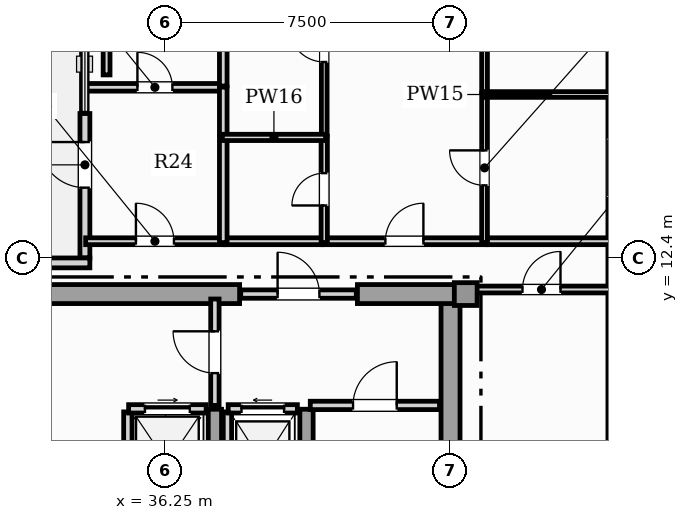
"""IFC4 building model, lengths in metres.
Left out: names, types, materials, properties, quantities, classifications, styles, units other than length and angle.
Written with IfcOpenShell. Run it as: python <this file> out.ifc"""

import sys

from ifc_helpers import new_model, si_unit, direction, frame, frame_2d, origin, origin_2d, place, context, subcontext, project, spatial, rectangle, extrude, element, fill, save


model = new_model("IFC4")
c1 = context("Model", 3, precision=1e-05, world=origin(), true_north=direction((0.0, 1.0)))
c2 = subcontext(c1, "Body", "Model", "MODEL_VIEW")
j1 = project(units=[si_unit("LENGTHUNIT", "METRE"), si_unit("PLANEANGLEUNIT", "RADIAN")], contexts=[c1])
p1 = place(None, origin())
s1 = spatial("IfcSite", under=j1, at=p1, CompositionType="ELEMENT")
p2 = place(p1, origin())
s2 = spatial("IfcBuilding", under=s1, at=p2, CompositionType="ELEMENT")
p3 = place(p2, frame((0.0, 0.0, 337.5)))
s3 = spatial("IfcBuildingStorey", under=s2, at=p3, CompositionType="ELEMENT", Elevation=337.5)
p4 = place(p3, frame((43.75, 0.92, 0.0), z_axis=(0.0, 0.0, 1.0), x_axis=(0.0, 1.0, 0.0)))
e1 = element("IfcWall", 1, at=p4, inside=s3, PredefinedType="SHEAR", context=c2, shape_type="SweptSolid", body=[
    extrude(rectangle(XDim=10.53, YDim=0.5, at=frame_2d((5.265, 0.0))), origin(), (0.0, 0.0, 1.0), 3.63),
])
p5 = place(p3, frame((30.9, 11.45, 0.0), z_axis=(0.0, 0.0, 1.0), x_axis=(1.0, 0.0, 0.0)))
e2 = element("IfcWall", 2, at=p5, inside=s3, PredefinedType="SHEAR", context=c2, shape_type="SweptSolid", body=[
    extrude(rectangle(XDim=7.3, YDim=0.5, at=frame_2d((3.65, 0.0))), origin(), (0.0, 0.0, 1.0), 3.63),
])
p6 = place(p3, frame((41.3, 11.45, 0.0), z_axis=(0.0, 0.0, 1.0), x_axis=(1.0, 0.0, 0.0)))
e3 = element("IfcWall", 3, at=p6, inside=s3, PredefinedType="SHEAR", context=c2, shape_type="SweptSolid", body=[
    extrude(rectangle(XDim=2.95, YDim=0.5, at=frame_2d((1.475, 0.0))), origin(), (0.0, 0.0, 1.0), 3.63),
])
for number, where, z_axis, x_axis in (
    (4, (37.55, 0.92, 0.0), (0.0, 0.0, 1.0), (0.0, 1.0, 0.0)),
    (5, (39.96, 0.92, 0.0), (0.0, 0.0, 1.0), (0.0, 1.0, 0.0)),
):
    element("IfcWall", number, at=place(p3, frame(where, z_axis=z_axis, x_axis=x_axis)), inside=s3, PredefinedType="SHEAR", context=c2, shape_type="SweptSolid", body=[
        extrude(rectangle(XDim=7.5, YDim=0.35, at=frame_2d((3.75, 0.0))), origin(), (0.0, 0.0, 1.0), 3.63),
    ])
p7 = place(p3, frame((44.15, 11.45, 0.0), z_axis=(0.0, 0.0, 1.0), x_axis=(1.0, 0.0, 0.0)))
e6 = element("IfcColumn", 6, at=p7, inside=s3, PredefinedType="COLUMN", context=c2, shape_type="SweptSolid", body=[
    extrude(rectangle(XDim=0.6, YDim=0.6, at=origin_2d()), origin(), (0.0, 0.0, 1.0), 3.85),
])
p8 = place(p3, frame((48.021, 3.24, 0.0), z_axis=(0.0, 0.0, 1.0), x_axis=(0.0, 1.0, 0.0)))
e7 = element("IfcWall", 7, at=p8, inside=s3, PredefinedType="SOLIDWALL", context=c2, shape_type="SweptSolid", body=[
    extrude(rectangle(XDim=25.374, YDim=0.26, at=frame_2d((12.687, 0.0))), origin(), (0.0, 0.0, 1.0), 3.63),
])
p9 = place(p8, frame((21.704, 0.0, 0.95)))
e8 = element("IfcOpeningElement", 8, at=p9, cuts=e7, PredefinedType="OPENING", context=c2, shape_type="SweptSolid", body=[
    extrude(rectangle(XDim=0.9, YDim=1.5, at=frame_2d((0.45, 0.75))), frame((0.0, 0.14, 0.0), z_axis=(0.0, -1.0, 0.0), x_axis=(1.0, 0.0, 0.0)), (0.0, 0.0, 1.0), 0.28),
])
p10 = place(p8, frame((10.781, 0.0, 0.9)))
e9 = element("IfcOpeningElement", 9, at=p10, cuts=e7, PredefinedType="OPENING", context=c2, shape_type="SweptSolid", body=[
    extrude(rectangle(XDim=1.5, YDim=1.95, at=frame_2d((0.75, 0.975))), frame((0.0, 0.14, 0.0), z_axis=(0.0, -1.0, 0.0), x_axis=(1.0, 0.0, 0.0)), (0.0, 0.0, 1.0), 0.28),
])
p11 = place(p8, frame((15.07, 0.0, 0.9)))
e10 = element("IfcOpeningElement", 10, at=p11, cuts=e7, PredefinedType="OPENING", context=c2, shape_type="SweptSolid", body=[
    extrude(rectangle(XDim=1.5, YDim=1.95, at=frame_2d((0.75, 0.975))), frame((0.0, 0.14, 0.0), z_axis=(0.0, -1.0, 0.0), x_axis=(1.0, 0.0, 0.0)), (0.0, 0.0, 1.0), 0.28),
])
p12 = place(p8, frame((19.056, 0.0, 0.9)))
e11 = element("IfcOpeningElement", 11, at=p12, cuts=e7, PredefinedType="OPENING", context=c2, shape_type="SweptSolid", body=[
    extrude(rectangle(XDim=1.5, YDim=1.95, at=frame_2d((0.75, 0.975))), frame((0.0, 0.14, 0.0), z_axis=(0.0, -1.0, 0.0), x_axis=(1.0, 0.0, 0.0)), (0.0, 0.0, 1.0), 0.28),
])
p13 = place(p8, frame((23.104, 0.0, 0.9)))
e12 = element("IfcOpeningElement", 12, at=p13, cuts=e7, PredefinedType="OPENING", context=c2, shape_type="SweptSolid", body=[
    extrude(rectangle(XDim=1.5, YDim=1.95, at=frame_2d((0.75, 0.975))), frame((0.0, 0.14, 0.0), z_axis=(0.0, -1.0, 0.0), x_axis=(1.0, 0.0, 0.0)), (0.0, 0.0, 1.0), 0.28),
])
p14 = place(p3, frame((34.13, 12.4, 0.0), z_axis=(0.0, 0.0, 1.0), x_axis=(0.0, 1.0, 0.0)))
e13 = element("IfcWall", 13, at=p14, inside=s3, PredefinedType="SOLIDWALL", context=c2, shape_type="SweptSolid", body=[
    extrude(rectangle(XDim=3.8, YDim=0.26, at=frame_2d((1.9, 0.0))), origin(), (0.0, 0.0, 1.0), 3.17),
])
p15 = place(p14, frame((1.85, 0.0, 0.0)))
e14 = element("IfcOpeningElement", 14, at=p15, cuts=e13, PredefinedType="OPENING", context=c2, shape_type="SweptSolid", body=[
    extrude(rectangle(XDim=1.2, YDim=2.2, at=frame_2d((0.6, 1.1))), frame((0.0, 0.14, 0.0), z_axis=(0.0, -1.0, 0.0), x_axis=(1.0, 0.0, 0.0)), (0.0, 0.0, 1.0), 0.28),
])
p16 = place(p3, frame((34.26, 12.27, 0.0), z_axis=(0.0, 0.0, 1.0), x_axis=(-1.0, 0.0, 0.0)))
e15 = element("IfcWall", 15, at=p16, inside=s3, PredefinedType="SOLIDWALL", context=c2, shape_type="SweptSolid", body=[
    extrude(rectangle(XDim=11.02, YDim=0.26, at=frame_2d((5.51, 0.0))), origin(), (0.0, 0.0, 1.0), 3.63),
])
p17 = place(p3, frame((37.88, 5.65, 0.0), z_axis=(0.0, 0.0, 1.0), x_axis=(0.0, 1.0, 0.0)))
e16 = element("IfcWall", 16, at=p17, inside=s3, PredefinedType="SOLIDWALL", context=c2, shape_type="SweptSolid", body=[
    extrude(rectangle(XDim=2.7, YDim=0.22, at=frame_2d((1.35, 0.0))), origin(), (0.0, 0.0, 1.0), 3.63),
])
p18 = place(p3, frame((37.9, 8.43, 0.0), z_axis=(0.0, 0.0, 1.0), x_axis=(1.0, 0.0, 0.0)))
e17 = element("IfcWall", 17, at=p18, inside=s3, PredefinedType="SOLIDWALL", context=c2, shape_type="SweptSolid", body=[
    extrude(rectangle(XDim=1.82, YDim=0.22, at=frame_2d((0.91, 0.0))), origin(), (0.0, 0.0, 1.0), 3.63),
])
p19 = place(p18, frame((0.35, 0.0, 0.0)))
e18 = element("IfcOpeningElement", 18, at=p19, cuts=e17, PredefinedType="OPENING", context=c2, shape_type="SweptSolid", body=[
    extrude(rectangle(XDim=1.12, YDim=2.25, at=frame_2d((0.56, 1.125))), frame((0.0, 0.12, 0.0), z_axis=(0.0, -1.0, 0.0), x_axis=(1.0, 0.0, 0.0)), (0.0, 0.0, 1.0), 0.24),
])
p20 = place(p3, frame((35.26, 5.65, 0.0), z_axis=(0.0, 0.0, 1.0), x_axis=(0.0, 1.0, 0.0)))
e19 = element("IfcWall", 19, at=p20, inside=s3, PredefinedType="SOLIDWALL", context=c2, shape_type="SweptSolid", body=[
    extrude(rectangle(XDim=2.7, YDim=0.22, at=frame_2d((1.35, 0.0))), origin(), (0.0, 0.0, 1.0), 3.63),
])
p21 = place(p3, frame((35.28, 8.43, 0.0), z_axis=(0.0, 0.0, 1.0), x_axis=(1.0, 0.0, 0.0)))
e20 = element("IfcWall", 20, at=p21, inside=s3, PredefinedType="SOLIDWALL", context=c2, shape_type="SweptSolid", body=[
    extrude(rectangle(XDim=2.04, YDim=0.22, at=frame_2d((1.02, 0.0))), origin(), (0.0, 0.0, 1.0), 3.63),
])
p22 = place(p21, frame((0.43, 0.0, 0.0)))
e21 = element("IfcOpeningElement", 21, at=p22, cuts=e20, PredefinedType="OPENING", context=c2, shape_type="SweptSolid", body=[
    extrude(rectangle(XDim=1.18, YDim=2.2, at=frame_2d((0.59, 1.1))), frame((0.0, 0.12, 0.0), z_axis=(0.0, -1.0, 0.0), x_axis=(1.0, 0.0, 0.0)), (0.0, 0.0, 1.0), 0.24),
])
p23 = place(p3, frame((40.06, 8.52, 0.0), z_axis=(0.0, 0.0, 1.0), x_axis=(1.0, 0.0, 0.0)))
e22 = element("IfcWall", 22, at=p23, inside=s3, PredefinedType="SOLIDWALL", context=c2, shape_type="SweptSolid", body=[
    extrude(rectangle(XDim=3.4, YDim=0.22, at=frame_2d((1.7, 0.0))), origin(), (0.0, 0.0, 1.0), 3.63),
])
p24 = place(p23, frame((1.125, 0.0, 0.0)))
e23 = element("IfcOpeningElement", 23, at=p24, cuts=e22, PredefinedType="OPENING", context=c2, shape_type="SweptSolid", body=[
    extrude(rectangle(XDim=1.15, YDim=2.2, at=frame_2d((0.575, 1.1))), frame((0.0, 0.12, 0.0), z_axis=(0.0, -1.0, 0.0), x_axis=(1.0, 0.0, 0.0)), (0.0, 0.0, 1.0), 0.24),
])
p25 = place(p3, frame((37.55, 8.52, 0.0), z_axis=(0.0, 0.0, 1.0), x_axis=(0.0, 1.0, 0.0)))
e24 = element("IfcWall", 24, at=p25, inside=s3, PredefinedType="SOLIDWALL", context=c2, shape_type="SweptSolid", body=[
    extrude(rectangle(XDim=2.8, YDim=0.22, at=frame_2d((1.4, 0.0))), origin(), (0.0, 0.0, 1.0), 3.085),
])
p26 = place(p25, frame((0.85, 0.0, 0.0)))
e25 = element("IfcOpeningElement", 25, at=p26, cuts=e24, PredefinedType="OPENING", context=c2, shape_type="SweptSolid", body=[
    extrude(rectangle(XDim=1.1, YDim=2.2, at=frame_2d((0.55, 1.1))), frame((0.0, 0.12, 0.0), z_axis=(0.0, -1.0, 0.0), x_axis=(1.0, 0.0, 0.0)), (0.0, 0.0, 1.0), 0.24),
])
p27 = place(p3, frame((38.23, 11.45, 0.0), z_axis=(0.0, 0.0, 1.0), x_axis=(1.0, 0.0, 0.0)))
e26 = element("IfcWall", 26, at=p27, inside=s3, PredefinedType="SOLIDWALL", context=c2, shape_type="SweptSolid", body=[
    extrude(rectangle(XDim=3.04, YDim=0.22, at=frame_2d((1.52, 0.0))), origin(), (0.0, 0.0, 1.0), 3.63),
])
p28 = place(p27, frame((0.97, 0.0, 0.0)))
e27 = element("IfcOpeningElement", 27, at=p28, cuts=e26, PredefinedType="OPENING", context=c2, shape_type="SweptSolid", body=[
    extrude(rectangle(XDim=1.1, YDim=2.2, at=frame_2d((0.55, 1.1))), frame((0.0, 0.12, 0.0), z_axis=(0.0, -1.0, 0.0), x_axis=(1.0, 0.0, 0.0)), (0.0, 0.0, 1.0), 0.24),
])
p29 = place(p3, frame((44.285, 11.57, 0.0), z_axis=(0.0, 0.0, 1.0), x_axis=(1.0, 0.0, 0.0)))
e28 = element("IfcWall", 28, at=p29, inside=s3, PredefinedType="PARTITIONING", context=c2, shape_type="SweptSolid", body=[
    extrude(rectangle(XDim=3.717, YDim=0.18, at=frame_2d((1.859, 0.0))), origin(), (0.0, 0.0, 1.0), 3.63),
])
p30 = place(p29, frame((1.359, 0.0, 0.0)))
e29 = element("IfcOpeningElement", 29, at=p30, cuts=e28, PredefinedType="OPENING", context=c2, shape_type="SweptSolid", body=[
    extrude(rectangle(XDim=1.0, YDim=2.15, at=frame_2d((0.5, 1.075))), frame((0.0, 0.1, 0.0), z_axis=(0.0, -1.0, 0.0), x_axis=(1.0, 0.0, 0.0)), (0.0, 0.0, 1.0), 0.2),
])
p31 = place(p3, frame((34.149, 12.84, 0.0), z_axis=(0.0, 0.0, 1.0), x_axis=(1.0, 0.0, 0.0)))
e30 = element("IfcWall", 30, at=p31, inside=s3, PredefinedType="PARTITIONING", context=c2, shape_type="SweptSolid", body=[
    extrude(rectangle(XDim=3.646, YDim=0.18, at=frame_2d((1.823, 0.0))), origin(), (0.0, 0.0, 1.0), 3.63),
])
p32 = place(p31, frame((1.323, 0.0, 0.0)))
e31 = element("IfcOpeningElement", 31, at=p32, cuts=e30, PredefinedType="OPENING", context=c2, shape_type="SweptSolid", body=[
    extrude(rectangle(XDim=1.0, YDim=2.15, at=frame_2d((0.5, 1.075))), frame((0.0, 0.1, 0.0), z_axis=(0.0, -1.0, 0.0), x_axis=(1.0, 0.0, 0.0)), (0.0, 0.0, 1.0), 0.2),
])
p33 = place(p3, frame((40.392, 12.84, 0.0), z_axis=(0.0, 0.0, 1.0), x_axis=(1.0, 0.0, 0.0)))
e32 = element("IfcWall", 32, at=p33, inside=s3, PredefinedType="PARTITIONING", context=c2, shape_type="SweptSolid", body=[
    extrude(rectangle(XDim=4.289, YDim=0.18, at=frame_2d((2.144, 0.0))), origin(), (0.0, 0.0, 1.0), 3.63),
])
p34 = place(p33, frame((1.644, 0.0, 0.0)))
e33 = element("IfcOpeningElement", 33, at=p34, cuts=e32, PredefinedType="OPENING", context=c2, shape_type="SweptSolid", body=[
    extrude(rectangle(XDim=1.0, YDim=2.15, at=frame_2d((0.5, 1.075))), frame((0.0, 0.1, 0.0), z_axis=(0.0, -1.0, 0.0), x_axis=(1.0, 0.0, 0.0)), (0.0, 0.0, 1.0), 0.2),
])
p35 = place(p3, frame((37.825, 12.84, 0.0), z_axis=(0.0, 0.0, 1.0), x_axis=(1.0, 0.0, 0.0)))
e34 = element("IfcWall", 34, at=p35, inside=s3, PredefinedType="PARTITIONING", context=c2, shape_type="SweptSolid", body=[
    extrude(rectangle(XDim=2.537, YDim=0.18, at=frame_2d((1.269, 0.0))), origin(), (0.0, 0.0, 1.0), 3.63),
])
p36 = place(p3, frame((44.71, 12.84, 0.0), z_axis=(0.0, 0.0, 1.0), x_axis=(1.0, 0.0, 0.0)))
e35 = element("IfcWall", 35, at=p36, inside=s3, PredefinedType="PARTITIONING", context=c2, shape_type="SweptSolid", body=[
    extrude(rectangle(XDim=3.292, YDim=0.18, at=frame_2d((1.646, 0.0))), origin(), (0.0, 0.0, 1.0), 3.63),
])
p37 = place(p3, frame((34.148, 16.89, 0.0), z_axis=(0.0, 0.0, 1.0), x_axis=(1.0, 0.0, 0.0)))
e36 = element("IfcWall", 36, at=p37, inside=s3, PredefinedType="PARTITIONING", context=c2, shape_type="SweptSolid", body=[
    extrude(rectangle(XDim=3.647, YDim=0.2, at=frame_2d((1.823, 0.0))), origin(), (0.0, 0.0, 1.0), 3.63),
])
p38 = place(p37, frame((1.364, 0.0, 0.0)))
e37 = element("IfcOpeningElement", 37, at=p38, cuts=e36, PredefinedType="OPENING", context=c2, shape_type="SweptSolid", body=[
    extrude(rectangle(XDim=0.92, YDim=2.1, at=frame_2d((0.46, 1.05))), frame((0.0, 0.11, 0.0), z_axis=(0.0, -1.0, 0.0), x_axis=(1.0, 0.0, 0.0)), (0.0, 0.0, 1.0), 0.22),
])
p39 = place(p3, frame((37.77, 12.805, 0.0), z_axis=(0.0, 0.0, 1.0), x_axis=(0.0, 1.0, 0.0)))
e38 = element("IfcWall", 38, at=p39, inside=s3, PredefinedType="PARTITIONING", context=c2, shape_type="SweptSolid", body=[
    extrude(rectangle(XDim=2.802, YDim=0.2, at=frame_2d((1.401, 0.0))), origin(), (0.0, 0.0, 1.0), 3.63),
])
p40 = place(p3, frame((37.77, 15.637, 0.0), z_axis=(0.0, 0.0, 1.0), x_axis=(0.0, 1.0, 0.0)))
e39 = element("IfcWall", 39, at=p40, inside=s3, PredefinedType="PARTITIONING", context=c2, shape_type="SweptSolid", body=[
    extrude(rectangle(XDim=1.258, YDim=0.2, at=frame_2d((0.629, 0.0))), origin(), (0.0, 0.0, 1.0), 3.63),
])
p41 = place(p3, frame((37.77, 16.925, 0.0), z_axis=(0.0, 0.0, 1.0), x_axis=(0.0, 1.0, 0.0)))
e40 = element("IfcWall", 40, at=p41, inside=s3, PredefinedType="PARTITIONING", context=c2, shape_type="SweptSolid", body=[
    extrude(rectangle(XDim=3.472, YDim=0.2, at=frame_2d((1.736, 0.0))), origin(), (0.0, 0.0, 1.0), 3.63),
])
p42 = place(p3, frame((40.427, 12.805, 0.0), z_axis=(0.0, 0.0, 1.0), x_axis=(0.0, 1.0, 0.0)))
e41 = element("IfcWall", 41, at=p42, inside=s3, PredefinedType="PLUMBINGWALL", context=c2, shape_type="SweptSolid", body=[
    extrude(rectangle(XDim=2.802, YDim=0.165, at=frame_2d((1.401, 0.0))), origin(), (0.0, 0.0, 1.0), 3.63),
])
p43 = place(p42, frame((0.976, 0.0, 0.0)))
e42 = element("IfcOpeningElement", 42, at=p43, cuts=e41, PredefinedType="OPENING", context=c2, shape_type="SweptSolid", body=[
    extrude(rectangle(XDim=0.85, YDim=2.1, at=frame_2d((0.425, 1.05))), frame((0.0, 0.093, 0.0), z_axis=(0.0, -1.0, 0.0), x_axis=(1.0, 0.0, 0.0)), (0.0, 0.0, 1.0), 0.185),
])
p44 = place(p3, frame((40.427, 15.637, 0.0), z_axis=(0.0, 0.0, 1.0), x_axis=(0.0, 1.0, 0.0)))
e43 = element("IfcWall", 43, at=p44, inside=s3, PredefinedType="PARTITIONING", context=c2, shape_type="SweptSolid", body=[
    extrude(rectangle(XDim=4.76, YDim=0.15, at=frame_2d((2.38, 0.0))), origin(), (0.0, 0.0, 1.0), 3.63),
])
p45 = place(p44, frame((1.92, 0.0, 0.0)))
e44 = element("IfcOpeningElement", 44, at=p45, cuts=e43, PredefinedType="OPENING", context=c2, shape_type="SweptSolid", body=[
    extrude(rectangle(XDim=0.92, YDim=2.1, at=frame_2d((0.46, 1.05))), frame((0.0, 0.085, 0.0), z_axis=(0.0, -1.0, 0.0), x_axis=(1.0, 0.0, 0.0)), (0.0, 0.0, 1.0), 0.17),
])
p46 = place(p3, frame((44.646, 12.805, 0.0), z_axis=(0.0, 0.0, 1.0), x_axis=(0.0, 1.0, 0.0)))
e45 = element("IfcWall", 45, at=p46, inside=s3, PredefinedType="PARTITIONING", context=c2, shape_type="SweptSolid", body=[
    extrude(rectangle(XDim=3.931, YDim=0.15, at=frame_2d((1.965, 0.0))), origin(), (0.0, 0.0, 1.0), 3.63),
])
p47 = place(p46, frame((1.506, 0.0, 0.0)))
e46 = element("IfcOpeningElement", 46, at=p47, cuts=e45, PredefinedType="OPENING", context=c2, shape_type="SweptSolid", body=[
    extrude(rectangle(XDim=0.92, YDim=2.1, at=frame_2d((0.46, 1.05))), frame((0.0, 0.085, 0.0), z_axis=(0.0, -1.0, 0.0), x_axis=(1.0, 0.0, 0.0)), (0.0, 0.0, 1.0), 0.17),
])
p48 = place(p3, frame((44.646, 16.766, 0.0), z_axis=(0.0, 0.0, 1.0), x_axis=(0.0, 1.0, 0.0)))
e47 = element("IfcWall", 47, at=p48, inside=s3, PredefinedType="PARTITIONING", context=c2, shape_type="SweptSolid", body=[
    extrude(rectangle(XDim=4.688, YDim=0.15, at=frame_2d((2.344, 0.0))), origin(), (0.0, 0.0, 1.0), 3.63),
])
p49 = place(p48, frame((1.884, 0.0, 0.0)))
e48 = element("IfcOpeningElement", 48, at=p49, cuts=e47, PredefinedType="OPENING", context=c2, shape_type="SweptSolid", body=[
    extrude(rectangle(XDim=0.92, YDim=2.1, at=frame_2d((0.46, 1.05))), frame((0.0, 0.085, 0.0), z_axis=(0.0, -1.0, 0.0), x_axis=(1.0, 0.0, 0.0)), (0.0, 0.0, 1.0), 0.17),
])
p50 = place(p3, frame((37.745, 15.572, 0.0), z_axis=(0.0, 0.0, 1.0), x_axis=(1.0, 0.0, 0.0)))
e49 = element("IfcWall", 49, at=p50, inside=s3, PredefinedType="PLUMBINGWALL", context=c2, shape_type="SweptSolid", body=[
    extrude(rectangle(XDim=2.717, YDim=0.165, at=frame_2d((1.358, 0.0))), origin(), (0.0, 0.0, 1.0), 3.63),
])
p51 = place(p3, frame((44.61, 16.701, 0.0), z_axis=(0.0, 0.0, 1.0), x_axis=(1.0, 0.0, 0.0)))
e50 = element("IfcWall", 50, at=p51, inside=s3, PredefinedType="PARTITIONING", context=c2, shape_type="SweptSolid", body=[
    extrude(rectangle(XDim=3.392, YDim=0.15, at=frame_2d((1.696, 0.0))), origin(), (0.0, 0.0, 1.0), 3.63),
])
p52 = place(p3, frame((34.7, 17.217, 0.0), z_axis=(0.0, 0.0, 1.0), x_axis=(0.0, 1.0, 0.0)))
e51 = element("IfcWall", 51, at=p52, inside=s3, PredefinedType="PARTITIONING", context=c2, shape_type="SweptSolid", body=[
    extrude(rectangle(XDim=7.448, YDim=0.18, at=frame_2d((3.724, 0.0))), origin(), (0.0, 0.0, 1.0), 3.63),
])
p53 = place(p15, origin())
e52 = element("IfcDoor", 52, at=p53, inside=s3, OperationType="SINGLE_SWING_RIGHT", PredefinedType="DOOR", context=c2, shape_type="SweptSolid", body=[
    extrude(rectangle(XDim=1.2, YDim=2.2, at=frame_2d((0.6, 1.1))), frame((0.0, 0.025, 0.0), z_axis=(0.0, -1.0, 0.0), x_axis=(1.0, 0.0, 0.0)), (0.0, 0.0, 1.0), 0.05),
])
fill(e14, e52)
p54 = place(p19, origin())
e53 = element("IfcDoor", 53, at=p54, inside=s3, OperationType="SLIDING_TO_LEFT", PredefinedType="DOOR", context=c2, shape_type="SweptSolid", body=[
    extrude(rectangle(XDim=1.12, YDim=2.25, at=frame_2d((0.56, 1.125))), frame((0.0, 0.025, 0.0), z_axis=(0.0, -1.0, 0.0), x_axis=(1.0, 0.0, 0.0)), (0.0, 0.0, 1.0), 0.05),
])
fill(e18, e53)
p55 = place(p22, origin())
e54 = element("IfcDoor", 54, at=p55, inside=s3, OperationType="SLIDING_TO_RIGHT", PredefinedType="DOOR", context=c2, shape_type="SweptSolid", body=[
    extrude(rectangle(XDim=1.18, YDim=2.2, at=frame_2d((0.59, 1.1))), frame((0.0, 0.025, 0.0), z_axis=(0.0, -1.0, 0.0), x_axis=(1.0, 0.0, 0.0)), (0.0, 0.0, 1.0), 0.05),
])
fill(e21, e54)
p56 = place(p24, origin())
e55 = element("IfcDoor", 55, at=p56, inside=s3, OperationType="SINGLE_SWING_RIGHT", PredefinedType="DOOR", context=c2, shape_type="SweptSolid", body=[
    extrude(rectangle(XDim=1.15, YDim=2.2, at=frame_2d((0.575, 1.1))), frame((0.0, 0.025, 0.0), z_axis=(0.0, -1.0, 0.0), x_axis=(1.0, 0.0, 0.0)), (0.0, 0.0, 1.0), 0.05),
])
fill(e23, e55)
p57 = place(p26, origin())
e56 = element("IfcDoor", 56, at=p57, inside=s3, OperationType="SINGLE_SWING_RIGHT", PredefinedType="DOOR", context=c2, shape_type="SweptSolid", body=[
    extrude(rectangle(XDim=1.1, YDim=2.2, at=frame_2d((0.55, 1.1))), frame((0.0, 0.025, 0.0), z_axis=(0.0, -1.0, 0.0), x_axis=(1.0, 0.0, 0.0)), (0.0, 0.0, 1.0), 0.05),
])
fill(e25, e56)
p58 = place(p28, origin())
e57 = element("IfcDoor", 57, at=p58, inside=s3, OperationType="SINGLE_SWING_LEFT", PredefinedType="DOOR", context=c2, shape_type="SweptSolid", body=[
    extrude(rectangle(XDim=1.1, YDim=2.2, at=frame_2d((0.55, 1.1))), frame((0.0, 0.025, 0.0), z_axis=(0.0, -1.0, 0.0), x_axis=(1.0, 0.0, 0.0)), (0.0, 0.0, 1.0), 0.05),
])
fill(e27, e57)
p59 = place(p30, origin())
e58 = element("IfcDoor", 58, at=p59, inside=s3, OperationType="SINGLE_SWING_RIGHT", PredefinedType="DOOR", context=c2, shape_type="SweptSolid", body=[
    extrude(rectangle(XDim=1.0, YDim=2.15, at=frame_2d((0.5, 1.075))), frame((0.0, 0.025, 0.0), z_axis=(0.0, -1.0, 0.0), x_axis=(1.0, 0.0, 0.0)), (0.0, 0.0, 1.0), 0.05),
])
fill(e29, e58)
p60 = place(p32, origin())
e59 = element("IfcDoor", 59, at=p60, inside=s3, OperationType="SINGLE_SWING_LEFT", PredefinedType="DOOR", context=c2, shape_type="SweptSolid", body=[
    extrude(rectangle(XDim=1.0, YDim=2.15, at=frame_2d((0.5, 1.075))), frame((0.0, 0.025, 0.0), z_axis=(0.0, -1.0, 0.0), x_axis=(1.0, 0.0, 0.0)), (0.0, 0.0, 1.0), 0.05),
])
fill(e31, e59)
p61 = place(p34, origin())
e60 = element("IfcDoor", 60, at=p61, inside=s3, OperationType="SINGLE_SWING_RIGHT", PredefinedType="DOOR", context=c2, shape_type="SweptSolid", body=[
    extrude(rectangle(XDim=1.0, YDim=2.15, at=frame_2d((0.5, 1.075))), frame((0.0, 0.025, 0.0), z_axis=(0.0, -1.0, 0.0), x_axis=(1.0, 0.0, 0.0)), (0.0, 0.0, 1.0), 0.05),
])
fill(e33, e60)
p62 = place(p38, origin())
e61 = element("IfcDoor", 61, at=p62, inside=s3, OperationType="SINGLE_SWING_LEFT", PredefinedType="DOOR", context=c2, shape_type="SweptSolid", body=[
    extrude(rectangle(XDim=0.92, YDim=2.1, at=frame_2d((0.46, 1.05))), frame((0.0, 0.025, 0.0), z_axis=(0.0, -1.0, 0.0), x_axis=(1.0, 0.0, 0.0)), (0.0, 0.0, 1.0), 0.05),
])
fill(e37, e61)
p63 = place(p43, origin())
e62 = element("IfcDoor", 62, at=p63, inside=s3, OperationType="SINGLE_SWING_LEFT", PredefinedType="DOOR", context=c2, shape_type="SweptSolid", body=[
    extrude(rectangle(XDim=0.85, YDim=2.1, at=frame_2d((0.425, 1.05))), frame((0.0, 0.025, 0.0), z_axis=(0.0, -1.0, 0.0), x_axis=(1.0, 0.0, 0.0)), (0.0, 0.0, 1.0), 0.05),
])
fill(e42, e62)
p64 = place(p45, origin())
e63 = element("IfcDoor", 63, at=p64, inside=s3, OperationType="SINGLE_SWING_RIGHT", PredefinedType="DOOR", context=c2, shape_type="SweptSolid", body=[
    extrude(rectangle(XDim=0.92, YDim=2.1, at=frame_2d((0.46, 1.05))), frame((0.0, 0.025, 0.0), z_axis=(0.0, -1.0, 0.0), x_axis=(1.0, 0.0, 0.0)), (0.0, 0.0, 1.0), 0.05),
])
fill(e44, e63)
p65 = place(p47, origin())
e64 = element("IfcDoor", 64, at=p65, inside=s3, OperationType="SINGLE_SWING_RIGHT", PredefinedType="DOOR", context=c2, shape_type="SweptSolid", body=[
    extrude(rectangle(XDim=0.92, YDim=2.1, at=frame_2d((0.46, 1.05))), frame((0.0, 0.025, 0.0), z_axis=(0.0, -1.0, 0.0), x_axis=(1.0, 0.0, 0.0)), (0.0, 0.0, 1.0), 0.05),
])
fill(e46, e64)
save(model, sys.argv[1])
